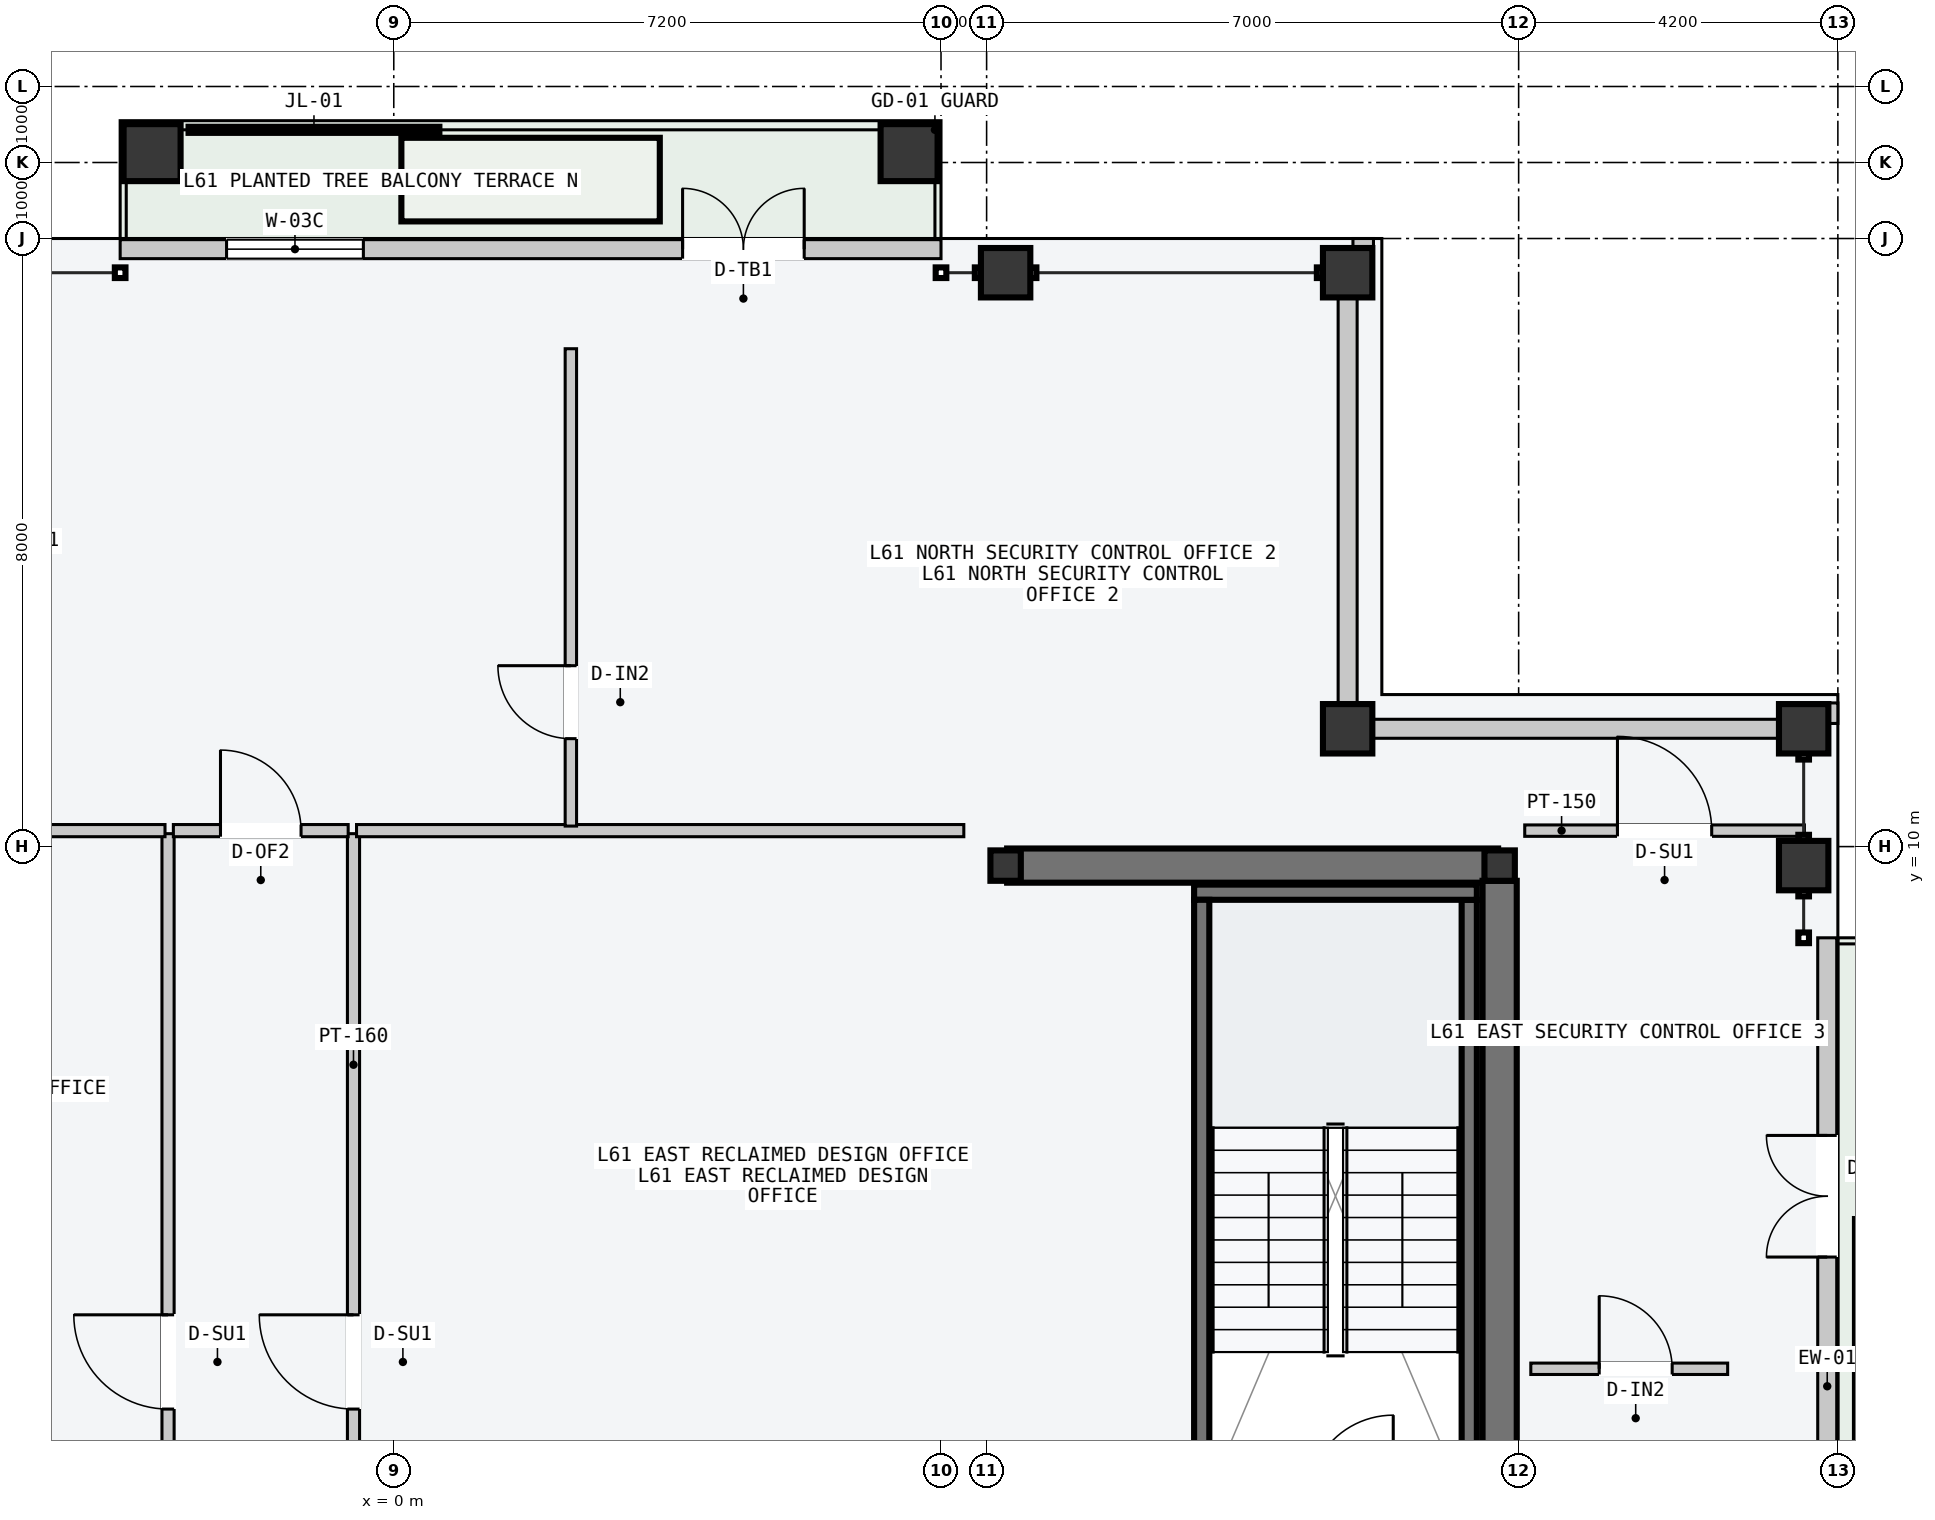
"""IFC4 building model, lengths in metres.
Left out: names, types, materials, properties, quantities, classifications, styles, units other than length and angle.
Written with IfcOpenShell. Run it as: python <this file> out.ifc"""

import sys

from ifc_helpers import new_model, si_unit, direction, frame, frame_2d, origin, origin_2d, place, context, subcontext, project, spatial, rectangle, hollow_rectangle, i_section, extrude, element, fill, save


model = new_model("IFC4")
c1 = context("Model", 3, precision=1e-05, world=origin(), true_north=direction((0.0, 1.0)))
c2 = subcontext(c1, "Body", "Model", "MODEL_VIEW")
j1 = project(units=[si_unit("LENGTHUNIT", "METRE"), si_unit("PLANEANGLEUNIT", "RADIAN")], contexts=[c1])
p1 = place(None, origin())
s1 = spatial("IfcSite", under=j1, at=p1, CompositionType="ELEMENT")
p2 = place(p1, origin())
s2 = spatial("IfcBuilding", under=s1, at=p2, CompositionType="ELEMENT")
p3 = place(p2, frame((0.0, 0.0, 232.8)))
s3 = spatial("IfcBuildingStorey", under=s2, at=p3, CompositionType="ELEMENT", Elevation=232.8)
p4 = place(p3, frame((8.07, 9.75, -0.2), z_axis=(0.0, 0.0, 1.0), x_axis=(1.0, 0.0, 0.0)))
e1 = element("IfcWall", 1, at=p4, inside=s3, PredefinedType="SHEAR", context=c2, shape_type="SweptSolid", body=[
    extrude(rectangle(XDim=6.46, YDim=0.45, at=frame_2d((3.23, 0.0))), origin(), (0.0, 0.0, 1.0), 3.6),
])
p5 = place(p3, frame((14.55, 0.2, -0.2), z_axis=(0.0, 0.0, 1.0), x_axis=(0.0, 1.0, 0.0)))
e2 = element("IfcWall", 2, at=p5, inside=s3, PredefinedType="SHEAR", context=c2, shape_type="SweptSolid", body=[
    extrude(rectangle(XDim=9.35, YDim=0.45, at=frame_2d((4.675, 0.0))), origin(), (0.0, 0.0, 1.0), 3.6),
])
p6 = place(p3, frame((14.15, 1.5, -0.2), z_axis=(0.0, 0.0, 1.0), x_axis=(0.0, 1.0, 0.0)))
e3 = element("IfcWall", 3, at=p6, inside=s3, PredefinedType="SOLIDWALL", context=c2, shape_type="SweptSolid", body=[
    extrude(rectangle(XDim=7.8, YDim=0.2, at=frame_2d((3.9, 0.0))), origin(), (0.0, 0.0, 1.0), 3.6),
])
p7 = place(p3, frame((10.53, 9.4, -0.2), z_axis=(0.0, 0.0, 1.0), x_axis=(1.0, 0.0, 0.0)))
e4 = element("IfcWall", 4, at=p7, inside=s3, PredefinedType="SOLIDWALL", context=c2, shape_type="SweptSolid", body=[
    extrude(rectangle(XDim=3.72, YDim=0.2, at=frame_2d((1.86, 0.0))), origin(), (0.0, 0.0, 1.0), 3.6),
])
p8 = place(p3, frame((10.63, 1.5, -0.2), z_axis=(0.0, 0.0, 1.0), x_axis=(0.0, 1.0, 0.0)))
e5 = element("IfcWall", 5, at=p8, inside=s3, PredefinedType="SOLIDWALL", context=c2, shape_type="SweptSolid", body=[
    extrude(rectangle(XDim=7.8, YDim=0.2, at=frame_2d((3.9, 0.0))), origin(), (0.0, 0.0, 1.0), 3.6),
])
for number, where, z_axis, x_axis in (
    (6, (8.05, 9.75, 0.0), (0.0, 0.0, 1.0), (1.0, 0.0, 0.0)),
    (7, (14.55, 9.75, 0.0), (0.0, 0.0, 1.0), (1.0, 0.0, 0.0)),
):
    element("IfcColumn", number, at=place(p3, frame(where, z_axis=z_axis, x_axis=x_axis)), inside=s3, PredefinedType="COLUMN", context=c2, shape_type="SweptSolid", body=[
        extrude(i_section(OverallWidth=0.4, OverallDepth=0.4, WebThickness=0.013, FlangeThickness=0.021, at=origin_2d()), origin(), (0.0, 0.0, 1.0), 3.6),
    ])
for number, where, z_axis, x_axis in (
    (8, (8.05, 17.55, 0.0), (0.0, 0.0, 1.0), (1.0, 0.0, 0.0)),
    (9, (12.55, 17.55, 0.0), (0.0, 0.0, 1.0), (1.0, 0.0, 0.0)),
    (10, (18.55, 9.75, 0.0), (0.0, 0.0, 1.0), (0.0, 1.0, 0.0)),
    (11, (18.55, 11.55, 0.0), (0.0, 0.0, 1.0), (0.0, 1.0, 0.0)),
    (12, (12.55, 11.55, 0.0), (0.0, 0.0, 1.0), (1.0, 0.0, 0.0)),
):
    element("IfcColumn", number, at=place(p3, frame(where, z_axis=z_axis, x_axis=x_axis)), inside=s3, PredefinedType="COLUMN", context=c2, shape_type="SweptSolid", body=[
        extrude(hollow_rectangle(XDim=0.65, YDim=0.65, WallThickness=0.028, at=origin_2d()), origin(), (0.0, 0.0, 1.0), 3.6),
    ])
for number, where, z_axis, x_axis in (
    (13, (-3.18, 19.13, 0.0), (0.0, 0.0, 1.0), (1.0, 0.0, 0.0)),
    (14, (6.78, 19.13, 0.0), (0.0, 0.0, 1.0), (1.0, 0.0, 0.0)),
):
    element("IfcColumn", number, at=place(p3, frame(where, z_axis=z_axis, x_axis=x_axis)), inside=s3, PredefinedType="COLUMN", context=c2, shape_type="SweptSolid", body=[
        extrude(hollow_rectangle(XDim=0.75, YDim=0.75, WallThickness=0.032, at=origin_2d()), origin(), (0.0, 0.0, 1.0), 3.6),
    ])
p9 = place(p3, frame((-3.6, 17.86, 0.0), z_axis=(0.0, 0.0, 1.0), x_axis=(1.0, 0.0, 0.0)))
e15 = element("IfcWall", 15, at=p9, inside=s3, PredefinedType="STANDARD", context=c2, shape_type="SweptSolid", body=[
    extrude(rectangle(XDim=10.8, YDim=0.25, at=frame_2d((5.4, 0.0))), origin(), (0.0, 0.0, 1.0), 3.4),
])
p10 = place(p9, frame((7.4, 0.0, 0.0)))
e16 = element("IfcOpeningElement", 16, at=p10, cuts=e15, PredefinedType="OPENING", context=c2, shape_type="SweptSolid", body=[
    extrude(rectangle(XDim=1.6, YDim=2.2, at=frame_2d((0.8, 1.1))), frame((0.0, 0.135, 0.0), z_axis=(0.0, -1.0, 0.0), x_axis=(1.0, 0.0, 0.0)), (0.0, 0.0, 1.0), 0.27),
])
p11 = place(p9, frame((1.4, 0.0, 0.85)))
e17 = element("IfcOpeningElement", 17, at=p11, cuts=e15, PredefinedType="OPENING", context=c2, shape_type="SweptSolid", body=[
    extrude(rectangle(XDim=1.8, YDim=2.05, at=frame_2d((0.9, 1.025))), frame((0.0, 0.135, 0.0), z_axis=(0.0, -1.0, 0.0), x_axis=(1.0, 0.0, 0.0)), (0.0, 0.0, 1.0), 0.27),
])
p12 = place(p3, frame((18.86, -2.0, 0.0), z_axis=(0.0, 0.0, 1.0), x_axis=(0.0, 1.0, 0.0)))
e18 = element("IfcWall", 18, at=p12, inside=s3, PredefinedType="STANDARD", context=c2, shape_type="SweptSolid", body=[
    extrude(rectangle(XDim=10.8, YDim=0.25, at=frame_2d((5.4, 0.0))), origin(), (0.0, 0.0, 1.0), 3.4),
])
p13 = place(p12, frame((6.6, 0.0, 0.0)))
e19 = element("IfcOpeningElement", 19, at=p13, cuts=e18, PredefinedType="OPENING", context=c2, shape_type="SweptSolid", body=[
    extrude(rectangle(XDim=1.6, YDim=2.2, at=frame_2d((0.8, 1.1))), frame((0.0, 0.135, 0.0), z_axis=(0.0, -1.0, 0.0), x_axis=(1.0, 0.0, 0.0)), (0.0, 0.0, 1.0), 0.27),
])
p14 = place(p12, frame((1.4, 0.0, 0.85)))
e20 = element("IfcOpeningElement", 20, at=p14, cuts=e18, PredefinedType="OPENING", context=c2, shape_type="SweptSolid", body=[
    extrude(rectangle(XDim=1.8, YDim=2.05, at=frame_2d((0.9, 1.025))), frame((0.0, 0.135, 0.0), z_axis=(0.0, -1.0, 0.0), x_axis=(1.0, 0.0, 0.0)), (0.0, 0.0, 1.0), 0.27),
])
for number, where, z_axis, x_axis in (
    (21, (12.885, 11.55, 0.0), (0.0, 0.0, 1.0), (1.0, 0.0, 0.0)),
    (22, (12.55, 11.885, 0.0), (0.0, 0.0, 1.0), (0.0, 1.0, 0.0)),
):
    element("IfcWall", number, at=place(p3, frame(where, z_axis=z_axis, x_axis=x_axis)), inside=s3, PredefinedType="STANDARD", context=c2, shape_type="SweptSolid", body=[
        extrude(rectangle(XDim=5.33, YDim=0.25, at=frame_2d((2.665, 0.0))), origin(), (0.0, 0.0, 1.0), 2.85),
    ])
for number, where, z_axis, x_axis in (
    (23, (12.62, 17.89, 0.0), (0.0, 0.0, 1.0), (1.0, 0.0, 0.0)),
    (24, (18.89, 11.62, 0.0), (0.0, 0.0, 1.0), (0.0, 1.0, 0.0)),
):
    element("IfcWall", number, at=place(p3, frame(where, z_axis=z_axis, x_axis=x_axis)), inside=s3, PredefinedType="PARAPET", context=c2, shape_type="SweptSolid", body=[
        extrude(rectangle(XDim=0.27, YDim=0.22, at=frame_2d((0.135, 0.0))), origin(), (0.0, 0.0, 1.0), 1.2),
    ])
p15 = place(p3, frame((-2.97, -3.5, 0.0), z_axis=(0.0, 0.0, 1.0), x_axis=(0.0, 1.0, 0.0)))
e25 = element("IfcWall", 25, at=p15, inside=s3, PredefinedType="PARTITIONING", context=c2, shape_type="SweptSolid", body=[
    extrude(rectangle(XDim=13.67, YDim=0.16, at=frame_2d((6.835, 0.0))), origin(), (0.0, 0.0, 1.0), 3.4),
])
p16 = place(p15, frame((6.1, 0.0, 0.0)))
e26 = element("IfcOpeningElement", 26, at=p16, cuts=e25, PredefinedType="OPENING", context=c2, shape_type="SweptSolid", body=[
    extrude(rectangle(XDim=1.24, YDim=2.24, at=frame_2d((0.62, 1.12))), frame((0.0, 0.09, 0.0), z_axis=(0.0, -1.0, 0.0), x_axis=(1.0, 0.0, 0.0)), (0.0, 0.0, 1.0), 0.18),
])
p17 = place(p15, frame((1.6, 0.0, 0.0)))
e27 = element("IfcOpeningElement", 27, at=p17, cuts=e25, PredefinedType="OPENING", context=c2, shape_type="SweptSolid", body=[
    extrude(rectangle(XDim=0.96, YDim=2.18, at=frame_2d((0.48, 1.09))), frame((0.0, 0.09, 0.0), z_axis=(0.0, -1.0, 0.0), x_axis=(1.0, 0.0, 0.0)), (0.0, 0.0, 1.0), 0.18),
])
p18 = place(p3, frame((-7.5, 10.21, 0.0), z_axis=(0.0, 0.0, 1.0), x_axis=(1.0, 0.0, 0.0)))
e28 = element("IfcWall", 28, at=p18, inside=s3, PredefinedType="PARTITIONING", context=c2, shape_type="SweptSolid", body=[
    extrude(rectangle(XDim=4.49, YDim=0.16, at=frame_2d((2.245, 0.0))), origin(), (0.0, 0.0, 1.0), 3.4),
])
p19 = place(p3, frame((-0.53, -3.5, 0.0), z_axis=(0.0, 0.0, 1.0), x_axis=(0.0, 1.0, 0.0)))
e29 = element("IfcWall", 29, at=p19, inside=s3, PredefinedType="PARTITIONING", context=c2, shape_type="SweptSolid", body=[
    extrude(rectangle(XDim=13.67, YDim=0.16, at=frame_2d((6.835, 0.0))), origin(), (0.0, 0.0, 1.0), 3.4),
])
p20 = place(p19, frame((6.1, 0.0, 0.0)))
e30 = element("IfcOpeningElement", 30, at=p20, cuts=e29, PredefinedType="OPENING", context=c2, shape_type="SweptSolid", body=[
    extrude(rectangle(XDim=1.24, YDim=2.24, at=frame_2d((0.62, 1.12))), frame((0.0, 0.09, 0.0), z_axis=(0.0, -1.0, 0.0), x_axis=(1.0, 0.0, 0.0)), (0.0, 0.0, 1.0), 0.18),
])
p21 = place(p19, frame((1.6, 0.0, 0.0)))
e31 = element("IfcOpeningElement", 31, at=p21, cuts=e29, PredefinedType="OPENING", context=c2, shape_type="SweptSolid", body=[
    extrude(rectangle(XDim=0.96, YDim=2.18, at=frame_2d((0.48, 1.09))), frame((0.0, 0.09, 0.0), z_axis=(0.0, -1.0, 0.0), x_axis=(1.0, 0.0, 0.0)), (0.0, 0.0, 1.0), 0.18),
])
p22 = place(p3, frame((-0.49, 10.21, 0.0), z_axis=(0.0, 0.0, 1.0), x_axis=(1.0, 0.0, 0.0)))
e32 = element("IfcWall", 32, at=p22, inside=s3, PredefinedType="PARTITIONING", context=c2, shape_type="SweptSolid", body=[
    extrude(rectangle(XDim=7.99, YDim=0.16, at=frame_2d((3.995, 0.0))), origin(), (0.0, 0.0, 1.0), 3.4),
])
p23 = place(p3, frame((2.33, 10.27, 0.0), z_axis=(0.0, 0.0, 1.0), x_axis=(0.0, 1.0, 0.0)))
e33 = element("IfcWall", 33, at=p23, inside=s3, PredefinedType="PARTITIONING", context=c2, shape_type="SweptSolid", body=[
    extrude(rectangle(XDim=6.28, YDim=0.15, at=frame_2d((3.14, 0.0))), origin(), (0.0, 0.0, 1.0), 3.4),
])
p24 = place(p23, frame((1.15, 0.0, 0.0)))
e34 = element("IfcOpeningElement", 34, at=p24, cuts=e33, PredefinedType="OPENING", context=c2, shape_type="SweptSolid", body=[
    extrude(rectangle(XDim=0.96, YDim=2.18, at=frame_2d((0.48, 1.09))), frame((0.0, 0.085, 0.0), z_axis=(0.0, -1.0, 0.0), x_axis=(1.0, 0.0, 0.0)), (0.0, 0.0, 1.0), 0.17),
])
p25 = place(p3, frame((-2.9, 10.21, 0.0), z_axis=(0.0, 0.0, 1.0), x_axis=(1.0, 0.0, 0.0)))
e35 = element("IfcWall", 35, at=p25, inside=s3, PredefinedType="PARTITIONING", context=c2, shape_type="SweptSolid", body=[
    extrude(rectangle(XDim=2.3, YDim=0.16, at=frame_2d((1.15, 0.0))), origin(), (0.0, 0.0, 1.0), 3.4),
])
p26 = place(p25, frame((0.62, 0.0, 0.0)))
e36 = element("IfcOpeningElement", 36, at=p26, cuts=e35, PredefinedType="OPENING", context=c2, shape_type="SweptSolid", body=[
    extrude(rectangle(XDim=1.06, YDim=2.2, at=frame_2d((0.53, 1.1))), frame((0.0, 0.09, 0.0), z_axis=(0.0, -1.0, 0.0), x_axis=(1.0, 0.0, 0.0)), (0.0, 0.0, 1.0), 0.18),
])
p27 = place(p3, frame((14.88, 10.21, 0.0), z_axis=(0.0, 0.0, 1.0), x_axis=(1.0, 0.0, 0.0)))
e37 = element("IfcWall", 37, at=p27, inside=s3, PredefinedType="PARTITIONING", context=c2, shape_type="SweptSolid", body=[
    extrude(rectangle(XDim=3.68, YDim=0.15, at=frame_2d((1.84, 0.0))), origin(), (0.0, 0.0, 1.0), 3.4),
])
p28 = place(p27, frame((1.22, 0.0, 0.0)))
e38 = element("IfcOpeningElement", 38, at=p28, cuts=e37, PredefinedType="OPENING", context=c2, shape_type="SweptSolid", body=[
    extrude(rectangle(XDim=1.24, YDim=2.24, at=frame_2d((0.62, 1.12))), frame((0.0, 0.085, 0.0), z_axis=(0.0, -1.0, 0.0), x_axis=(1.0, 0.0, 0.0)), (0.0, 0.0, 1.0), 0.17),
])
p29 = place(p3, frame((14.96, 3.13, 0.0), z_axis=(0.0, 0.0, 1.0), x_axis=(1.0, 0.0, 0.0)))
e39 = element("IfcWall", 39, at=p29, inside=s3, PredefinedType="PARTITIONING", context=c2, shape_type="SweptSolid", body=[
    extrude(rectangle(XDim=2.59, YDim=0.15, at=frame_2d((1.295, 0.0))), origin(), (0.0, 0.0, 1.0), 3.4),
])
p30 = place(p29, frame((0.9, 0.0, 0.0)))
e40 = element("IfcOpeningElement", 40, at=p30, cuts=e39, PredefinedType="OPENING", context=c2, shape_type="SweptSolid", body=[
    extrude(rectangle(XDim=0.96, YDim=2.18, at=frame_2d((0.48, 1.09))), frame((0.0, 0.085, 0.0), z_axis=(0.0, -1.0, 0.0), x_axis=(1.0, 0.0, 0.0)), (0.0, 0.0, 1.0), 0.17),
])
p31 = place(p10, origin())
e41 = element("IfcDoor", 41, at=p31, inside=s3, OperationType="DOUBLE_DOOR_SINGLE_SWING", PredefinedType="DOOR", context=c2, shape_type="SweptSolid", body=[
    extrude(rectangle(XDim=1.6, YDim=2.2, at=frame_2d((0.8, 1.1))), frame((0.0, 0.025, 0.0), z_axis=(0.0, -1.0, 0.0), x_axis=(1.0, 0.0, 0.0)), (0.0, 0.0, 1.0), 0.05),
])
fill(e16, e41)
p32 = place(p11, origin())
e42 = element("IfcWindow", 42, at=p32, inside=s3, PartitioningType="SINGLE_PANEL", PredefinedType="WINDOW", context=c2, shape_type="SweptSolid", body=[
    extrude(rectangle(XDim=1.8, YDim=2.05, at=frame_2d((0.9, 1.025))), frame((0.0, 0.03, 0.0), z_axis=(0.0, -1.0, 0.0), x_axis=(1.0, 0.0, 0.0)), (0.0, 0.0, 1.0), 0.06),
])
fill(e17, e42)
p33 = place(p13, origin())
e43 = element("IfcDoor", 43, at=p33, inside=s3, OperationType="DOUBLE_DOOR_SINGLE_SWING", PredefinedType="DOOR", context=c2, shape_type="SweptSolid", body=[
    extrude(rectangle(XDim=1.6, YDim=2.2, at=frame_2d((0.8, 1.1))), frame((0.0, 0.025, 0.0), z_axis=(0.0, -1.0, 0.0), x_axis=(1.0, 0.0, 0.0)), (0.0, 0.0, 1.0), 0.05),
])
fill(e19, e43)
p34 = place(p16, origin())
e44 = element("IfcDoor", 44, at=p34, inside=s3, OperationType="SINGLE_SWING_RIGHT", PredefinedType="DOOR", context=c2, shape_type="SweptSolid", body=[
    extrude(rectangle(XDim=1.24, YDim=2.24, at=frame_2d((0.62, 1.12))), frame((0.0, 0.025, 0.0), z_axis=(0.0, -1.0, 0.0), x_axis=(1.0, 0.0, 0.0)), (0.0, 0.0, 1.0), 0.05),
])
fill(e26, e44)
p35 = place(p20, origin())
e45 = element("IfcDoor", 45, at=p35, inside=s3, OperationType="SINGLE_SWING_RIGHT", PredefinedType="DOOR", context=c2, shape_type="SweptSolid", body=[
    extrude(rectangle(XDim=1.24, YDim=2.24, at=frame_2d((0.62, 1.12))), frame((0.0, 0.025, 0.0), z_axis=(0.0, -1.0, 0.0), x_axis=(1.0, 0.0, 0.0)), (0.0, 0.0, 1.0), 0.05),
])
fill(e30, e45)
p36 = place(p24, origin())
e46 = element("IfcDoor", 46, at=p36, inside=s3, OperationType="SINGLE_SWING_RIGHT", PredefinedType="DOOR", context=c2, shape_type="SweptSolid", body=[
    extrude(rectangle(XDim=0.96, YDim=2.18, at=frame_2d((0.48, 1.09))), frame((0.0, 0.025, 0.0), z_axis=(0.0, -1.0, 0.0), x_axis=(1.0, 0.0, 0.0)), (0.0, 0.0, 1.0), 0.05),
])
fill(e34, e46)
p37 = place(p26, origin())
e47 = element("IfcDoor", 47, at=p37, inside=s3, OperationType="SINGLE_SWING_LEFT", PredefinedType="DOOR", context=c2, shape_type="SweptSolid", body=[
    extrude(rectangle(XDim=1.06, YDim=2.2, at=frame_2d((0.53, 1.1))), frame((0.0, 0.025, 0.0), z_axis=(0.0, -1.0, 0.0), x_axis=(1.0, 0.0, 0.0)), (0.0, 0.0, 1.0), 0.05),
])
fill(e36, e47)
p38 = place(p28, origin())
e48 = element("IfcDoor", 48, at=p38, inside=s3, OperationType="SINGLE_SWING_LEFT", PredefinedType="DOOR", context=c2, shape_type="SweptSolid", body=[
    extrude(rectangle(XDim=1.24, YDim=2.24, at=frame_2d((0.62, 1.12))), frame((0.0, 0.025, 0.0), z_axis=(0.0, -1.0, 0.0), x_axis=(1.0, 0.0, 0.0)), (0.0, 0.0, 1.0), 0.05),
])
fill(e38, e48)
p39 = place(p30, origin())
e49 = element("IfcDoor", 49, at=p39, inside=s3, OperationType="SINGLE_SWING_LEFT", PredefinedType="DOOR", context=c2, shape_type="SweptSolid", body=[
    extrude(rectangle(XDim=0.96, YDim=2.18, at=frame_2d((0.48, 1.09))), frame((0.0, 0.025, 0.0), z_axis=(0.0, -1.0, 0.0), x_axis=(1.0, 0.0, 0.0)), (0.0, 0.0, 1.0), 0.05),
])
fill(e40, e49)
save(model, sys.argv[1])
